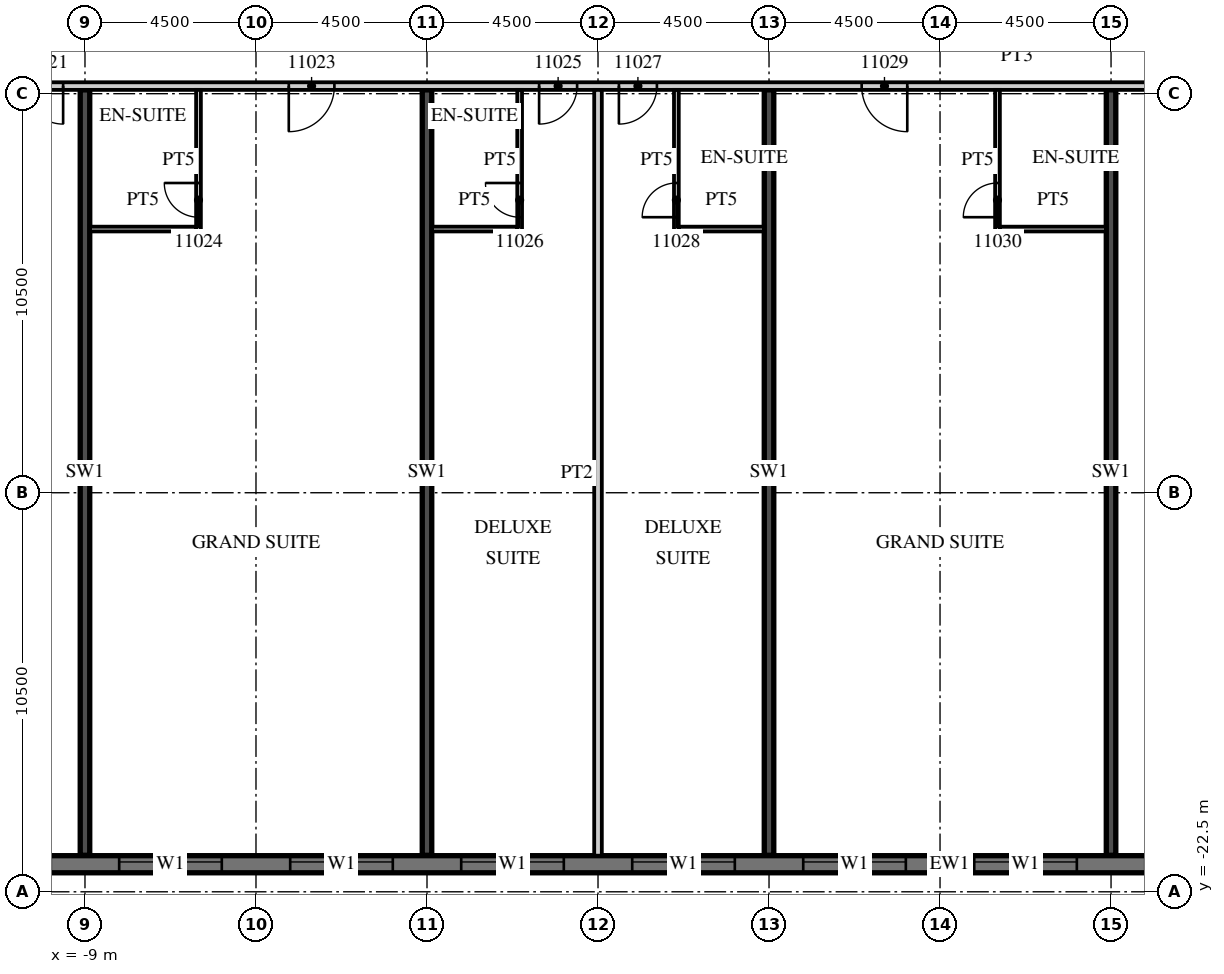
"""IFC4 building model, lengths in metres.
Left out: names, types, materials, properties, quantities, classifications, styles, units other than length and angle.
Written with IfcOpenShell. Run it as: python <this file> out.ifc"""

import sys

from ifc_helpers import new_model, si_unit, direction, frame, frame_2d, origin, place, context, subcontext, project, spatial, rectangle, extrude, element, fill, save


model = new_model("IFC4")
c1 = context("Model", 3, precision=1e-05, world=origin(), true_north=direction((0.0, 1.0)))
c2 = subcontext(c1, "Body", "Model", "MODEL_VIEW")
j1 = project(units=[si_unit("LENGTHUNIT", "METRE"), si_unit("PLANEANGLEUNIT", "RADIAN")], contexts=[c1])
p1 = place(None, origin())
s1 = spatial("IfcSite", under=j1, at=p1, CompositionType="ELEMENT")
p2 = place(p1, origin())
s2 = spatial("IfcBuilding", under=s1, at=p2, CompositionType="ELEMENT")
p3 = place(p2, frame((0.0, 0.0, 66.6)))
s3 = spatial("IfcBuildingStorey", under=s2, at=p3, CompositionType="ELEMENT", Elevation=66.6)
for number, where, z_axis, x_axis in (
    (1, (-9.0, -21.54, 0.0), (0.0, 0.0, 1.0), (0.0, 1.0, 0.0)),
    (2, (0.0, -21.54, 0.0), (0.0, 0.0, 1.0), (0.0, 1.0, 0.0)),
    (3, (9.0, -21.54, 0.0), (0.0, 0.0, 1.0), (0.0, 1.0, 0.0)),
    (4, (18.0, -21.54, 0.0), (0.0, 0.0, 1.0), (0.0, 1.0, 0.0)),
):
    element("IfcWall", number, at=place(p3, frame(where, z_axis=z_axis, x_axis=x_axis)), inside=s3, PredefinedType="SHEAR", context=c2, shape_type="SweptSolid", body=[
        extrude(rectangle(XDim=20.14, YDim=0.25, at=frame_2d((10.07, 0.0))), origin(), (0.0, 0.0, 1.0), 3.3),
    ])
p4 = place(p3, frame((-13.5, -21.775, 0.0), z_axis=(0.0, 0.0, 1.0), x_axis=(1.0, 0.0, 0.0)))
e5 = element("IfcWall", 5, at=p4, inside=s3, PredefinedType="SOLIDWALL", context=c2, shape_type="SweptSolid", body=[
    extrude(rectangle(XDim=54.5, YDim=0.45, at=frame_2d((27.25, 0.0))), origin(), (0.0, 0.0, 1.0), 3.02),
])
p5 = place(p4, frame((0.9, 0.0, 0.45)))
e6 = element("IfcOpeningElement", 6, at=p5, cuts=e5, PredefinedType="OPENING", context=c2, shape_type="SweptSolid", body=[
    extrude(rectangle(XDim=2.7, YDim=2.25, at=frame_2d((1.35, 1.125))), frame((0.0, 0.235, 0.0), z_axis=(0.0, -1.0, 0.0), x_axis=(1.0, 0.0, 0.0)), (0.0, 0.0, 1.0), 0.47),
])
p6 = place(p4, frame((5.4, 0.0, 0.45)))
e7 = element("IfcOpeningElement", 7, at=p6, cuts=e5, PredefinedType="OPENING", context=c2, shape_type="SweptSolid", body=[
    extrude(rectangle(XDim=2.7, YDim=2.25, at=frame_2d((1.35, 1.125))), frame((0.0, 0.235, 0.0), z_axis=(0.0, -1.0, 0.0), x_axis=(1.0, 0.0, 0.0)), (0.0, 0.0, 1.0), 0.47),
])
p7 = place(p4, frame((9.9, 0.0, 0.45)))
e8 = element("IfcOpeningElement", 8, at=p7, cuts=e5, PredefinedType="OPENING", context=c2, shape_type="SweptSolid", body=[
    extrude(rectangle(XDim=2.7, YDim=2.25, at=frame_2d((1.35, 1.125))), frame((0.0, 0.235, 0.0), z_axis=(0.0, -1.0, 0.0), x_axis=(1.0, 0.0, 0.0)), (0.0, 0.0, 1.0), 0.47),
])
p8 = place(p4, frame((14.4, 0.0, 0.45)))
e9 = element("IfcOpeningElement", 9, at=p8, cuts=e5, PredefinedType="OPENING", context=c2, shape_type="SweptSolid", body=[
    extrude(rectangle(XDim=2.7, YDim=2.25, at=frame_2d((1.35, 1.125))), frame((0.0, 0.235, 0.0), z_axis=(0.0, -1.0, 0.0), x_axis=(1.0, 0.0, 0.0)), (0.0, 0.0, 1.0), 0.47),
])
p9 = place(p4, frame((18.9, 0.0, 0.45)))
e10 = element("IfcOpeningElement", 10, at=p9, cuts=e5, PredefinedType="OPENING", context=c2, shape_type="SweptSolid", body=[
    extrude(rectangle(XDim=2.7, YDim=2.25, at=frame_2d((1.35, 1.125))), frame((0.0, 0.235, 0.0), z_axis=(0.0, -1.0, 0.0), x_axis=(1.0, 0.0, 0.0)), (0.0, 0.0, 1.0), 0.47),
])
p10 = place(p4, frame((23.4, 0.0, 0.45)))
e11 = element("IfcOpeningElement", 11, at=p10, cuts=e5, PredefinedType="OPENING", context=c2, shape_type="SweptSolid", body=[
    extrude(rectangle(XDim=2.7, YDim=2.25, at=frame_2d((1.35, 1.125))), frame((0.0, 0.235, 0.0), z_axis=(0.0, -1.0, 0.0), x_axis=(1.0, 0.0, 0.0)), (0.0, 0.0, 1.0), 0.47),
])
p11 = place(p4, frame((27.9, 0.0, 0.45)))
e12 = element("IfcOpeningElement", 12, at=p11, cuts=e5, PredefinedType="OPENING", context=c2, shape_type="SweptSolid", body=[
    extrude(rectangle(XDim=2.7, YDim=2.25, at=frame_2d((1.35, 1.125))), frame((0.0, 0.235, 0.0), z_axis=(0.0, -1.0, 0.0), x_axis=(1.0, 0.0, 0.0)), (0.0, 0.0, 1.0), 0.47),
])
p12 = place(p4, frame((32.4, 0.0, 0.45)))
e13 = element("IfcOpeningElement", 13, at=p12, cuts=e5, PredefinedType="OPENING", context=c2, shape_type="SweptSolid", body=[
    extrude(rectangle(XDim=2.7, YDim=2.25, at=frame_2d((1.35, 1.125))), frame((0.0, 0.235, 0.0), z_axis=(0.0, -1.0, 0.0), x_axis=(1.0, 0.0, 0.0)), (0.0, 0.0, 1.0), 0.47),
])
p13 = place(p4, frame((36.9, 0.0, 0.45)))
e14 = element("IfcOpeningElement", 14, at=p13, cuts=e5, PredefinedType="OPENING", context=c2, shape_type="SweptSolid", body=[
    extrude(rectangle(XDim=2.7, YDim=2.25, at=frame_2d((1.35, 1.125))), frame((0.0, 0.235, 0.0), z_axis=(0.0, -1.0, 0.0), x_axis=(1.0, 0.0, 0.0)), (0.0, 0.0, 1.0), 0.47),
])
p14 = place(p4, frame((41.4, 0.0, 0.45)))
e15 = element("IfcOpeningElement", 15, at=p14, cuts=e5, PredefinedType="OPENING", context=c2, shape_type="SweptSolid", body=[
    extrude(rectangle(XDim=2.7, YDim=2.25, at=frame_2d((1.35, 1.125))), frame((0.0, 0.235, 0.0), z_axis=(0.0, -1.0, 0.0), x_axis=(1.0, 0.0, 0.0)), (0.0, 0.0, 1.0), 0.47),
])
p15 = place(p4, frame((45.9, 0.0, 0.45)))
e16 = element("IfcOpeningElement", 16, at=p15, cuts=e5, PredefinedType="OPENING", context=c2, shape_type="SweptSolid", body=[
    extrude(rectangle(XDim=2.7, YDim=2.25, at=frame_2d((1.35, 1.125))), frame((0.0, 0.235, 0.0), z_axis=(0.0, -1.0, 0.0), x_axis=(1.0, 0.0, 0.0)), (0.0, 0.0, 1.0), 0.47),
])
p16 = place(p4, frame((50.4, 0.0, 0.45)))
e17 = element("IfcOpeningElement", 17, at=p16, cuts=e5, PredefinedType="OPENING", context=c2, shape_type="SweptSolid", body=[
    extrude(rectangle(XDim=2.7, YDim=2.25, at=frame_2d((1.35, 1.125))), frame((0.0, 0.235, 0.0), z_axis=(0.0, -1.0, 0.0), x_axis=(1.0, 0.0, 0.0)), (0.0, 0.0, 1.0), 0.47),
])
p17 = place(p3, frame((-13.5, -1.3, 0.0), z_axis=(0.0, 0.0, 1.0), x_axis=(1.0, 0.0, 0.0)))
e18 = element("IfcWall", 18, at=p17, inside=s3, PredefinedType="PARTITIONING", context=c2, shape_type="SweptSolid", body=[
    extrude(rectangle(XDim=58.05, YDim=0.2, at=frame_2d((29.025, 0.0))), origin(), (0.0, 0.0, 1.0), 3.02),
])
p18 = place(p17, frame((2.925, 0.0, 0.0)))
e19 = element("IfcOpeningElement", 19, at=p18, cuts=e18, PredefinedType="OPENING", context=c2, shape_type="SweptSolid", body=[
    extrude(rectangle(XDim=1.0, YDim=2.1, at=frame_2d((0.5, 1.05))), frame((0.0, 0.11, 0.0), z_axis=(0.0, -1.0, 0.0), x_axis=(1.0, 0.0, 0.0)), (0.0, 0.0, 1.0), 0.22),
])
p19 = place(p17, frame((9.863, 0.0, 0.0)))
e20 = element("IfcOpeningElement", 20, at=p19, cuts=e18, PredefinedType="OPENING", context=c2, shape_type="SweptSolid", body=[
    extrude(rectangle(XDim=1.2, YDim=2.1, at=frame_2d((0.6, 1.05))), frame((0.0, 0.11, 0.0), z_axis=(0.0, -1.0, 0.0), x_axis=(1.0, 0.0, 0.0)), (0.0, 0.0, 1.0), 0.22),
])
p20 = place(p17, frame((16.45, 0.0, 0.0)))
e21 = element("IfcOpeningElement", 21, at=p20, cuts=e18, PredefinedType="OPENING", context=c2, shape_type="SweptSolid", body=[
    extrude(rectangle(XDim=1.0, YDim=2.1, at=frame_2d((0.5, 1.05))), frame((0.0, 0.11, 0.0), z_axis=(0.0, -1.0, 0.0), x_axis=(1.0, 0.0, 0.0)), (0.0, 0.0, 1.0), 0.22),
])
p21 = place(p17, frame((18.55, 0.0, 0.0)))
e22 = element("IfcOpeningElement", 22, at=p21, cuts=e18, PredefinedType="OPENING", context=c2, shape_type="SweptSolid", body=[
    extrude(rectangle(XDim=1.0, YDim=2.1, at=frame_2d((0.5, 1.05))), frame((0.0, 0.11, 0.0), z_axis=(0.0, -1.0, 0.0), x_axis=(1.0, 0.0, 0.0)), (0.0, 0.0, 1.0), 0.22),
])
p22 = place(p17, frame((24.938, 0.0, 0.0)))
e23 = element("IfcOpeningElement", 23, at=p22, cuts=e18, PredefinedType="OPENING", context=c2, shape_type="SweptSolid", body=[
    extrude(rectangle(XDim=1.2, YDim=2.1, at=frame_2d((0.6, 1.05))), frame((0.0, 0.11, 0.0), z_axis=(0.0, -1.0, 0.0), x_axis=(1.0, 0.0, 0.0)), (0.0, 0.0, 1.0), 0.22),
])
p23 = place(p17, frame((33.938, 0.0, 0.0)))
e24 = element("IfcOpeningElement", 24, at=p23, cuts=e18, PredefinedType="OPENING", context=c2, shape_type="SweptSolid", body=[
    extrude(rectangle(XDim=1.2, YDim=2.1, at=frame_2d((0.6, 1.05))), frame((0.0, 0.11, 0.0), z_axis=(0.0, -1.0, 0.0), x_axis=(1.0, 0.0, 0.0)), (0.0, 0.0, 1.0), 0.22),
])
p24 = place(p17, frame((42.938, 0.0, 0.0)))
e25 = element("IfcOpeningElement", 25, at=p24, cuts=e18, PredefinedType="OPENING", context=c2, shape_type="SweptSolid", body=[
    extrude(rectangle(XDim=1.2, YDim=2.1, at=frame_2d((0.6, 1.05))), frame((0.0, 0.11, 0.0), z_axis=(0.0, -1.0, 0.0), x_axis=(1.0, 0.0, 0.0)), (0.0, 0.0, 1.0), 0.22),
])
p25 = place(p17, frame((52.425, 0.0, 0.0)))
e26 = element("IfcOpeningElement", 26, at=p25, cuts=e18, PredefinedType="OPENING", context=c2, shape_type="SweptSolid", body=[
    extrude(rectangle(XDim=1.0, YDim=2.1, at=frame_2d((0.5, 1.05))), frame((0.0, 0.11, 0.0), z_axis=(0.0, -1.0, 0.0), x_axis=(1.0, 0.0, 0.0)), (0.0, 0.0, 1.0), 0.22),
])
p26 = place(p17, frame((56.525, 0.0, 0.0)))
e27 = element("IfcOpeningElement", 27, at=p26, cuts=e18, PredefinedType="OPENING", context=c2, shape_type="SweptSolid", body=[
    extrude(rectangle(XDim=1.0, YDim=2.1, at=frame_2d((0.5, 1.05))), frame((0.0, 0.11, 0.0), z_axis=(0.0, -1.0, 0.0), x_axis=(1.0, 0.0, 0.0)), (0.0, 0.0, 1.0), 0.22),
])
p27 = place(p3, frame((-6.013, -5.125, 0.0), z_axis=(0.0, 0.0, 1.0), x_axis=(0.0, 1.0, 0.0)))
e28 = element("IfcWall", 28, at=p27, inside=s3, PredefinedType="PARTITIONING", context=c2, shape_type="SweptSolid", body=[
    extrude(rectangle(XDim=3.725, YDim=0.125, at=frame_2d((1.863, 0.0))), origin(), (0.0, 0.0, 1.0), 3.02),
])
p28 = place(p27, frame((0.375, 0.0, 0.0)))
e29 = element("IfcOpeningElement", 29, at=p28, cuts=e28, PredefinedType="OPENING", context=c2, shape_type="SweptSolid", body=[
    extrude(rectangle(XDim=0.9, YDim=2.1, at=frame_2d((0.45, 1.05))), frame((0.0, 0.073, 0.0), z_axis=(0.0, -1.0, 0.0), x_axis=(1.0, 0.0, 0.0)), (0.0, 0.0, 1.0), 0.145),
])
p29 = place(p3, frame((-8.875, -5.062, 0.0), z_axis=(0.0, 0.0, 1.0), x_axis=(1.0, 0.0, 0.0)))
e30 = element("IfcWall", 30, at=p29, inside=s3, PredefinedType="PARTITIONING", context=c2, shape_type="SweptSolid", body=[
    extrude(rectangle(XDim=2.8, YDim=0.125, at=frame_2d((1.4, 0.0))), origin(), (0.0, 0.0, 1.0), 3.02),
])
p30 = place(p3, frame((4.5, -21.55, 0.0), z_axis=(0.0, 0.0, 1.0), x_axis=(0.0, 1.0, 0.0)))
e31 = element("IfcWall", 31, at=p30, inside=s3, PredefinedType="PARTITIONING", context=c2, shape_type="SweptSolid", body=[
    extrude(rectangle(XDim=20.15, YDim=0.2, at=frame_2d((10.075, 0.0))), origin(), (0.0, 0.0, 1.0), 3.02),
])
p31 = place(p3, frame((2.438, -5.125, 0.0), z_axis=(0.0, 0.0, 1.0), x_axis=(0.0, 1.0, 0.0)))
e32 = element("IfcWall", 32, at=p31, inside=s3, PredefinedType="PARTITIONING", context=c2, shape_type="SweptSolid", body=[
    extrude(rectangle(XDim=3.725, YDim=0.125, at=frame_2d((1.863, 0.0))), origin(), (0.0, 0.0, 1.0), 3.02),
])
p32 = place(p31, frame((0.375, 0.0, 0.0)))
e33 = element("IfcOpeningElement", 33, at=p32, cuts=e32, PredefinedType="OPENING", context=c2, shape_type="SweptSolid", body=[
    extrude(rectangle(XDim=0.9, YDim=2.1, at=frame_2d((0.45, 1.05))), frame((0.0, 0.073, 0.0), z_axis=(0.0, -1.0, 0.0), x_axis=(1.0, 0.0, 0.0)), (0.0, 0.0, 1.0), 0.145),
])
p33 = place(p3, frame((0.125, -5.062, 0.0), z_axis=(0.0, 0.0, 1.0), x_axis=(1.0, 0.0, 0.0)))
e34 = element("IfcWall", 34, at=p33, inside=s3, PredefinedType="PARTITIONING", context=c2, shape_type="SweptSolid", body=[
    extrude(rectangle(XDim=2.25, YDim=0.125, at=frame_2d((1.125, 0.0))), origin(), (0.0, 0.0, 1.0), 3.02),
])
p34 = place(p3, frame((6.562, -5.125, 0.0), z_axis=(0.0, 0.0, 1.0), x_axis=(0.0, 1.0, 0.0)))
e35 = element("IfcWall", 35, at=p34, inside=s3, PredefinedType="PARTITIONING", context=c2, shape_type="SweptSolid", body=[
    extrude(rectangle(XDim=3.725, YDim=0.125, at=frame_2d((1.863, 0.0))), origin(), (0.0, 0.0, 1.0), 3.02),
])
p35 = place(p34, frame((0.375, 0.0, 0.0)))
e36 = element("IfcOpeningElement", 36, at=p35, cuts=e35, PredefinedType="OPENING", context=c2, shape_type="SweptSolid", body=[
    extrude(rectangle(XDim=0.9, YDim=2.1, at=frame_2d((0.45, 1.05))), frame((0.0, 0.073, 0.0), z_axis=(0.0, -1.0, 0.0), x_axis=(1.0, 0.0, 0.0)), (0.0, 0.0, 1.0), 0.145),
])
p36 = place(p3, frame((6.625, -5.062, 0.0), z_axis=(0.0, 0.0, 1.0), x_axis=(1.0, 0.0, 0.0)))
e37 = element("IfcWall", 37, at=p36, inside=s3, PredefinedType="PARTITIONING", context=c2, shape_type="SweptSolid", body=[
    extrude(rectangle(XDim=2.25, YDim=0.125, at=frame_2d((1.125, 0.0))), origin(), (0.0, 0.0, 1.0), 3.02),
])
p37 = place(p3, frame((15.012, -5.125, 0.0), z_axis=(0.0, 0.0, 1.0), x_axis=(0.0, 1.0, 0.0)))
e38 = element("IfcWall", 38, at=p37, inside=s3, PredefinedType="PARTITIONING", context=c2, shape_type="SweptSolid", body=[
    extrude(rectangle(XDim=3.725, YDim=0.125, at=frame_2d((1.863, 0.0))), origin(), (0.0, 0.0, 1.0), 3.02),
])
p38 = place(p37, frame((0.375, 0.0, 0.0)))
e39 = element("IfcOpeningElement", 39, at=p38, cuts=e38, PredefinedType="OPENING", context=c2, shape_type="SweptSolid", body=[
    extrude(rectangle(XDim=0.9, YDim=2.1, at=frame_2d((0.45, 1.05))), frame((0.0, 0.073, 0.0), z_axis=(0.0, -1.0, 0.0), x_axis=(1.0, 0.0, 0.0)), (0.0, 0.0, 1.0), 0.145),
])
p39 = place(p3, frame((15.075, -5.062, 0.0), z_axis=(0.0, 0.0, 1.0), x_axis=(1.0, 0.0, 0.0)))
e40 = element("IfcWall", 40, at=p39, inside=s3, PredefinedType="PARTITIONING", context=c2, shape_type="SweptSolid", body=[
    extrude(rectangle(XDim=2.8, YDim=0.125, at=frame_2d((1.4, 0.0))), origin(), (0.0, 0.0, 1.0), 3.02),
])
p40 = place(p6, origin())
e41 = element("IfcWindow", 41, at=p40, inside=s3, PartitioningType="SINGLE_PANEL", PredefinedType="WINDOW", context=c2, shape_type="SweptSolid", body=[
    extrude(rectangle(XDim=2.7, YDim=2.25, at=frame_2d((1.35, 1.125))), frame((0.0, 0.09, 0.0), z_axis=(0.0, -1.0, 0.0), x_axis=(1.0, 0.0, 0.0)), (0.0, 0.0, 1.0), 0.06),
])
fill(e7, e41)
p41 = place(p7, origin())
e42 = element("IfcWindow", 42, at=p41, inside=s3, PartitioningType="SINGLE_PANEL", PredefinedType="WINDOW", context=c2, shape_type="SweptSolid", body=[
    extrude(rectangle(XDim=2.7, YDim=2.25, at=frame_2d((1.35, 1.125))), frame((0.0, 0.09, 0.0), z_axis=(0.0, -1.0, 0.0), x_axis=(1.0, 0.0, 0.0)), (0.0, 0.0, 1.0), 0.06),
])
fill(e8, e42)
p42 = place(p8, origin())
e43 = element("IfcWindow", 43, at=p42, inside=s3, PartitioningType="SINGLE_PANEL", PredefinedType="WINDOW", context=c2, shape_type="SweptSolid", body=[
    extrude(rectangle(XDim=2.7, YDim=2.25, at=frame_2d((1.35, 1.125))), frame((0.0, 0.09, 0.0), z_axis=(0.0, -1.0, 0.0), x_axis=(1.0, 0.0, 0.0)), (0.0, 0.0, 1.0), 0.06),
])
fill(e9, e43)
p43 = place(p9, origin())
e44 = element("IfcWindow", 44, at=p43, inside=s3, PartitioningType="SINGLE_PANEL", PredefinedType="WINDOW", context=c2, shape_type="SweptSolid", body=[
    extrude(rectangle(XDim=2.7, YDim=2.25, at=frame_2d((1.35, 1.125))), frame((0.0, 0.09, 0.0), z_axis=(0.0, -1.0, 0.0), x_axis=(1.0, 0.0, 0.0)), (0.0, 0.0, 1.0), 0.06),
])
fill(e10, e44)
p44 = place(p10, origin())
e45 = element("IfcWindow", 45, at=p44, inside=s3, PartitioningType="SINGLE_PANEL", PredefinedType="WINDOW", context=c2, shape_type="SweptSolid", body=[
    extrude(rectangle(XDim=2.7, YDim=2.25, at=frame_2d((1.35, 1.125))), frame((0.0, 0.09, 0.0), z_axis=(0.0, -1.0, 0.0), x_axis=(1.0, 0.0, 0.0)), (0.0, 0.0, 1.0), 0.06),
])
fill(e11, e45)
p45 = place(p11, origin())
e46 = element("IfcWindow", 46, at=p45, inside=s3, PartitioningType="SINGLE_PANEL", PredefinedType="WINDOW", context=c2, shape_type="SweptSolid", body=[
    extrude(rectangle(XDim=2.7, YDim=2.25, at=frame_2d((1.35, 1.125))), frame((0.0, 0.09, 0.0), z_axis=(0.0, -1.0, 0.0), x_axis=(1.0, 0.0, 0.0)), (0.0, 0.0, 1.0), 0.06),
])
fill(e12, e46)
p46 = place(p18, origin())
e47 = element("IfcDoor", 47, at=p46, inside=s3, OperationType="SINGLE_SWING_RIGHT", PredefinedType="DOOR", context=c2, shape_type="SweptSolid", body=[
    extrude(rectangle(XDim=1.0, YDim=2.1, at=frame_2d((0.5, 1.05))), frame((0.0, 0.025, 0.0), z_axis=(0.0, -1.0, 0.0), x_axis=(1.0, 0.0, 0.0)), (0.0, 0.0, 1.0), 0.05),
])
fill(e19, e47)
p47 = place(p19, origin())
e48 = element("IfcDoor", 48, at=p47, inside=s3, OperationType="SINGLE_SWING_LEFT", PredefinedType="DOOR", context=c2, shape_type="SweptSolid", body=[
    extrude(rectangle(XDim=1.2, YDim=2.1, at=frame_2d((0.6, 1.05))), frame((0.0, 0.025, 0.0), z_axis=(0.0, -1.0, 0.0), x_axis=(1.0, 0.0, 0.0)), (0.0, 0.0, 1.0), 0.05),
])
fill(e20, e48)
p48 = place(p28, origin())
e49 = element("IfcDoor", 49, at=p48, inside=s3, OperationType="SINGLE_SWING_RIGHT", PredefinedType="DOOR", context=c2, shape_type="SweptSolid", body=[
    extrude(rectangle(XDim=0.9, YDim=2.1, at=frame_2d((0.45, 1.05))), frame((0.0, 0.025, 0.0), z_axis=(0.0, -1.0, 0.0), x_axis=(1.0, 0.0, 0.0)), (0.0, 0.0, 1.0), 0.05),
])
fill(e29, e49)
p49 = place(p20, origin())
e50 = element("IfcDoor", 50, at=p49, inside=s3, OperationType="SINGLE_SWING_LEFT", PredefinedType="DOOR", context=c2, shape_type="SweptSolid", body=[
    extrude(rectangle(XDim=1.0, YDim=2.1, at=frame_2d((0.5, 1.05))), frame((0.0, 0.025, 0.0), z_axis=(0.0, -1.0, 0.0), x_axis=(1.0, 0.0, 0.0)), (0.0, 0.0, 1.0), 0.05),
])
fill(e21, e50)
p50 = place(p32, origin())
e51 = element("IfcDoor", 51, at=p50, inside=s3, OperationType="SINGLE_SWING_RIGHT", PredefinedType="DOOR", context=c2, shape_type="SweptSolid", body=[
    extrude(rectangle(XDim=0.9, YDim=2.1, at=frame_2d((0.45, 1.05))), frame((0.0, 0.025, 0.0), z_axis=(0.0, -1.0, 0.0), x_axis=(1.0, 0.0, 0.0)), (0.0, 0.0, 1.0), 0.05),
])
fill(e33, e51)
p51 = place(p21, origin())
e52 = element("IfcDoor", 52, at=p51, inside=s3, OperationType="SINGLE_SWING_LEFT", PredefinedType="DOOR", context=c2, shape_type="SweptSolid", body=[
    extrude(rectangle(XDim=1.0, YDim=2.1, at=frame_2d((0.5, 1.05))), frame((0.0, 0.025, 0.0), z_axis=(0.0, -1.0, 0.0), x_axis=(1.0, 0.0, 0.0)), (0.0, 0.0, 1.0), 0.05),
])
fill(e22, e52)
p52 = place(p35, origin())
e53 = element("IfcDoor", 53, at=p52, inside=s3, OperationType="SINGLE_SWING_LEFT", PredefinedType="DOOR", context=c2, shape_type="SweptSolid", body=[
    extrude(rectangle(XDim=0.9, YDim=2.1, at=frame_2d((0.45, 1.05))), frame((0.0, 0.025, 0.0), z_axis=(0.0, -1.0, 0.0), x_axis=(1.0, 0.0, 0.0)), (0.0, 0.0, 1.0), 0.05),
])
fill(e36, e53)
p53 = place(p22, origin())
e54 = element("IfcDoor", 54, at=p53, inside=s3, OperationType="SINGLE_SWING_RIGHT", PredefinedType="DOOR", context=c2, shape_type="SweptSolid", body=[
    extrude(rectangle(XDim=1.2, YDim=2.1, at=frame_2d((0.6, 1.05))), frame((0.0, 0.025, 0.0), z_axis=(0.0, -1.0, 0.0), x_axis=(1.0, 0.0, 0.0)), (0.0, 0.0, 1.0), 0.05),
])
fill(e23, e54)
p54 = place(p38, origin())
e55 = element("IfcDoor", 55, at=p54, inside=s3, OperationType="SINGLE_SWING_LEFT", PredefinedType="DOOR", context=c2, shape_type="SweptSolid", body=[
    extrude(rectangle(XDim=0.9, YDim=2.1, at=frame_2d((0.45, 1.05))), frame((0.0, 0.025, 0.0), z_axis=(0.0, -1.0, 0.0), x_axis=(1.0, 0.0, 0.0)), (0.0, 0.0, 1.0), 0.05),
])
fill(e39, e55)
save(model, sys.argv[1])
